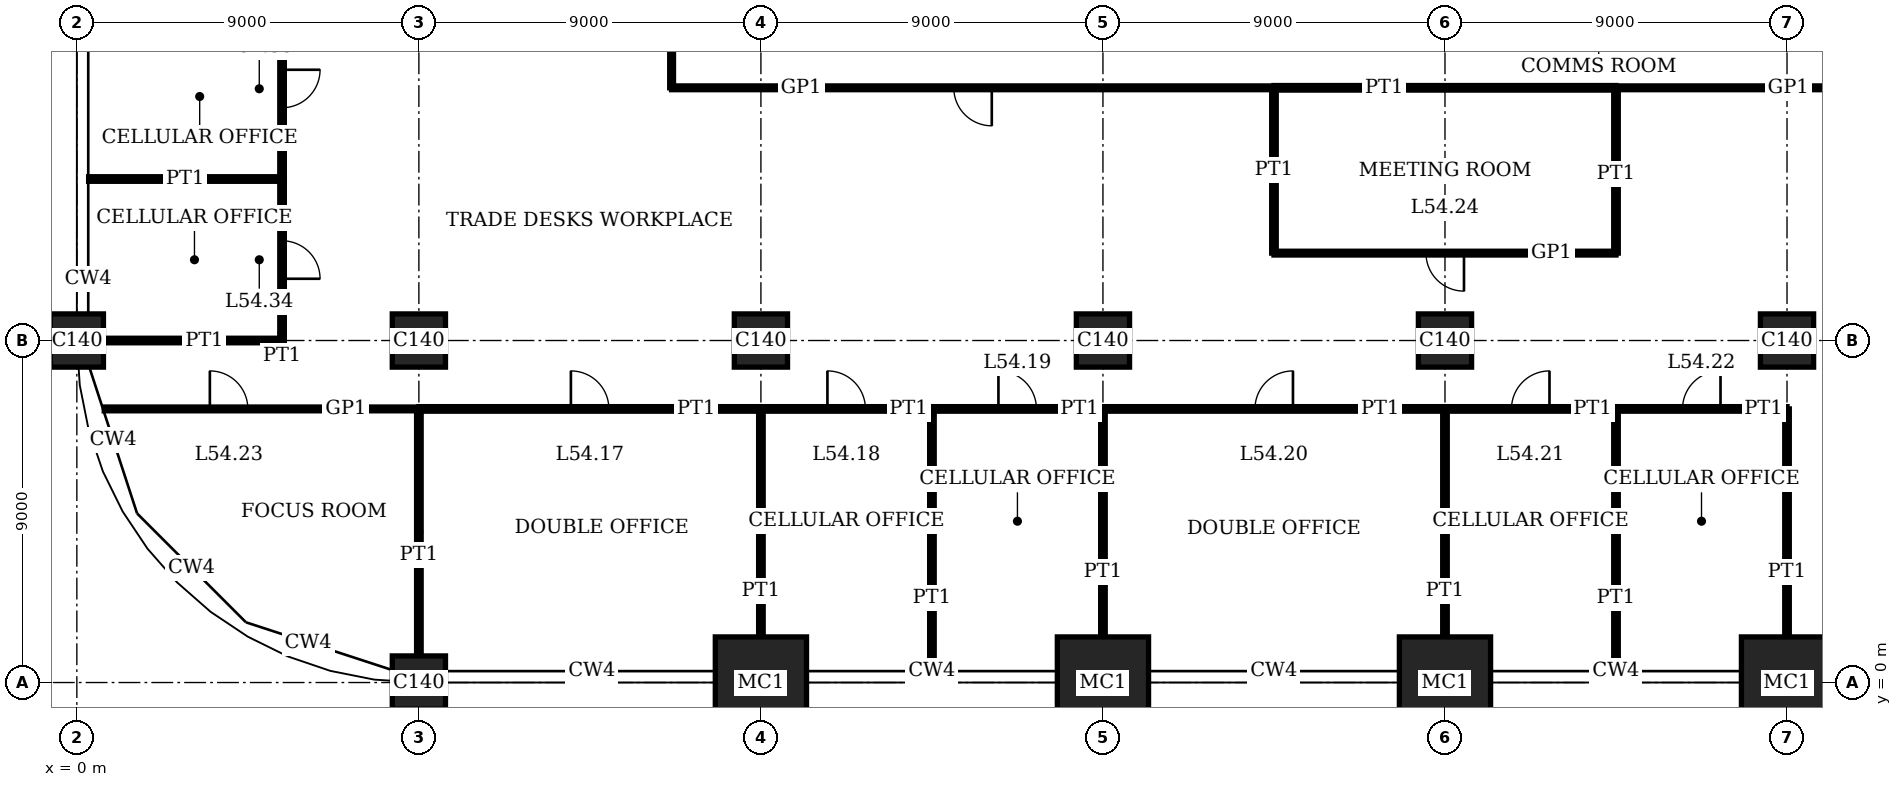
"""IFC4 building model, lengths in metres.
Left out: names, types, materials, properties, quantities, classifications, styles, units other than length and angle.
Written with IfcOpenShell. Run it as: python <this file> out.ifc"""

import sys

from ifc_helpers import new_model, si_unit, direction, frame, frame_2d, origin, origin_2d, place, context, subcontext, project, spatial, rectangle, extrude, element, fill, save


model = new_model("IFC4")
c1 = context("Model", 3, precision=1e-05, world=origin(), true_north=direction((0.0, 1.0)))
c2 = subcontext(c1, "Body", "Model", "MODEL_VIEW")
j1 = project(units=[si_unit("LENGTHUNIT", "METRE"), si_unit("PLANEANGLEUNIT", "RADIAN")], contexts=[c1])
p1 = place(None, origin())
s1 = spatial("IfcSite", under=j1, at=p1, CompositionType="ELEMENT")
p2 = place(p1, origin())
s2 = spatial("IfcBuilding", under=s1, at=p2, CompositionType="ELEMENT")
p3 = place(p2, frame((0.0, 0.0, 222.2)))
s3 = spatial("IfcBuildingStorey", under=s2, at=p3, CompositionType="ELEMENT", Elevation=222.2)
for number, where, z_axis, x_axis in (
    (1, (0.0, 9.0, 0.0), (0.0, 0.0, 1.0), (1.0, 0.0, 0.0)),
    (2, (9.0, 0.0, 0.0), (0.0, 0.0, 1.0), (1.0, 0.0, 0.0)),
    (3, (9.0, 9.0, 0.0), (0.0, 0.0, 1.0), (1.0, 0.0, 0.0)),
):
    element("IfcColumn", number, at=place(p3, frame(where, z_axis=z_axis, x_axis=x_axis)), inside=s3, PredefinedType="COLUMN", context=c2, shape_type="SweptSolid", body=[
        extrude(rectangle(XDim=1.4, YDim=1.4, at=origin_2d()), origin(), (0.0, 0.0, 1.0), 4.0),
    ])
p4 = place(p3, frame((18.0, 0.0, 0.0), z_axis=(0.0, 0.0, 1.0), x_axis=(1.0, 0.0, 0.0)))
e4 = element("IfcColumn", 4, at=p4, inside=s3, PredefinedType="COLUMN", context=c2, shape_type="SweptSolid", body=[
    extrude(rectangle(XDim=2.4, YDim=2.4, at=origin_2d()), origin(), (0.0, 0.0, 1.0), 4.0),
])
p5 = place(p3, frame((18.0, 9.0, 0.0), z_axis=(0.0, 0.0, 1.0), x_axis=(1.0, 0.0, 0.0)))
e5 = element("IfcColumn", 5, at=p5, inside=s3, PredefinedType="COLUMN", context=c2, shape_type="SweptSolid", body=[
    extrude(rectangle(XDim=1.4, YDim=1.4, at=origin_2d()), origin(), (0.0, 0.0, 1.0), 4.0),
])
p6 = place(p3, frame((27.0, 0.0, 0.0), z_axis=(0.0, 0.0, 1.0), x_axis=(1.0, 0.0, 0.0)))
e6 = element("IfcColumn", 6, at=p6, inside=s3, PredefinedType="COLUMN", context=c2, shape_type="SweptSolid", body=[
    extrude(rectangle(XDim=2.4, YDim=2.4, at=origin_2d()), origin(), (0.0, 0.0, 1.0), 4.0),
])
p7 = place(p3, frame((27.0, 9.0, 0.0), z_axis=(0.0, 0.0, 1.0), x_axis=(1.0, 0.0, 0.0)))
e7 = element("IfcColumn", 7, at=p7, inside=s3, PredefinedType="COLUMN", context=c2, shape_type="SweptSolid", body=[
    extrude(rectangle(XDim=1.4, YDim=1.4, at=origin_2d()), origin(), (0.0, 0.0, 1.0), 4.0),
])
p8 = place(p3, frame((36.0, 0.0, 0.0), z_axis=(0.0, 0.0, 1.0), x_axis=(1.0, 0.0, 0.0)))
e8 = element("IfcColumn", 8, at=p8, inside=s3, PredefinedType="COLUMN", context=c2, shape_type="SweptSolid", body=[
    extrude(rectangle(XDim=2.4, YDim=2.4, at=origin_2d()), origin(), (0.0, 0.0, 1.0), 4.0),
])
p9 = place(p3, frame((36.0, 9.0, 0.0), z_axis=(0.0, 0.0, 1.0), x_axis=(1.0, 0.0, 0.0)))
e9 = element("IfcColumn", 9, at=p9, inside=s3, PredefinedType="COLUMN", context=c2, shape_type="SweptSolid", body=[
    extrude(rectangle(XDim=1.4, YDim=1.4, at=origin_2d()), origin(), (0.0, 0.0, 1.0), 4.0),
])
p10 = place(p3, frame((45.0, 0.0, 0.0), z_axis=(0.0, 0.0, 1.0), x_axis=(1.0, 0.0, 0.0)))
e10 = element("IfcColumn", 10, at=p10, inside=s3, PredefinedType="COLUMN", context=c2, shape_type="SweptSolid", body=[
    extrude(rectangle(XDim=2.4, YDim=2.4, at=origin_2d()), origin(), (0.0, 0.0, 1.0), 4.0),
])
p11 = place(p3, frame((45.0, 9.0, 0.0), z_axis=(0.0, 0.0, 1.0), x_axis=(1.0, 0.0, 0.0)))
e11 = element("IfcColumn", 11, at=p11, inside=s3, PredefinedType="COLUMN", context=c2, shape_type="SweptSolid", body=[
    extrude(rectangle(XDim=1.4, YDim=1.4, at=origin_2d()), origin(), (0.0, 0.0, 1.0), 4.0),
])
p12 = place(p3, frame((9.0, 7.2, 0.0), z_axis=(0.0, 0.0, 1.0), x_axis=(1.0, 0.0, 0.0)))
e12 = element("IfcWall", 12, at=p12, inside=s3, PredefinedType="PARTITIONING", context=c2, shape_type="SweptSolid", body=[
    extrude(rectangle(XDim=9.0, YDim=0.12, at=frame_2d((4.5, 0.0))), origin(), (0.0, 0.0, 1.0), 3.75),
])
p13 = place(p12, frame((4.0, 0.0, 0.0)))
e13 = element("IfcOpeningElement", 13, at=p13, cuts=e12, PredefinedType="OPENING", context=c2, shape_type="SweptSolid", body=[
    extrude(rectangle(XDim=1.0, YDim=2.4, at=frame_2d((0.5, 1.2))), frame((0.0, 0.07, 0.0), z_axis=(0.0, -1.0, 0.0), x_axis=(1.0, 0.0, 0.0)), (0.0, 0.0, 1.0), 0.14),
])
p14 = place(p3, frame((18.0, 7.2, 0.0), z_axis=(0.0, 0.0, 1.0), x_axis=(1.0, 0.0, 0.0)))
e14 = element("IfcWall", 14, at=p14, inside=s3, PredefinedType="PARTITIONING", context=c2, shape_type="SweptSolid", body=[
    extrude(rectangle(XDim=4.5, YDim=0.12, at=frame_2d((2.25, 0.0))), origin(), (0.0, 0.0, 1.0), 3.75),
])
p15 = place(p14, frame((1.75, 0.0, 0.0)))
e15 = element("IfcOpeningElement", 15, at=p15, cuts=e14, PredefinedType="OPENING", context=c2, shape_type="SweptSolid", body=[
    extrude(rectangle(XDim=1.0, YDim=2.4, at=frame_2d((0.5, 1.2))), frame((0.0, 0.07, 0.0), z_axis=(0.0, -1.0, 0.0), x_axis=(1.0, 0.0, 0.0)), (0.0, 0.0, 1.0), 0.14),
])
p16 = place(p3, frame((22.5, 7.2, 0.0), z_axis=(0.0, 0.0, 1.0), x_axis=(1.0, 0.0, 0.0)))
e16 = element("IfcWall", 16, at=p16, inside=s3, PredefinedType="PARTITIONING", context=c2, shape_type="SweptSolid", body=[
    extrude(rectangle(XDim=4.5, YDim=0.12, at=frame_2d((2.25, 0.0))), origin(), (0.0, 0.0, 1.0), 3.75),
])
p17 = place(p16, frame((1.75, 0.0, 0.0)))
e17 = element("IfcOpeningElement", 17, at=p17, cuts=e16, PredefinedType="OPENING", context=c2, shape_type="SweptSolid", body=[
    extrude(rectangle(XDim=1.0, YDim=2.4, at=frame_2d((0.5, 1.2))), frame((0.0, 0.07, 0.0), z_axis=(0.0, -1.0, 0.0), x_axis=(1.0, 0.0, 0.0)), (0.0, 0.0, 1.0), 0.14),
])
p18 = place(p3, frame((27.0, 7.2, 0.0), z_axis=(0.0, 0.0, 1.0), x_axis=(1.0, 0.0, 0.0)))
e18 = element("IfcWall", 18, at=p18, inside=s3, PredefinedType="PARTITIONING", context=c2, shape_type="SweptSolid", body=[
    extrude(rectangle(XDim=9.0, YDim=0.12, at=frame_2d((4.5, 0.0))), origin(), (0.0, 0.0, 1.0), 3.75),
])
p19 = place(p18, frame((4.0, 0.0, 0.0)))
e19 = element("IfcOpeningElement", 19, at=p19, cuts=e18, PredefinedType="OPENING", context=c2, shape_type="SweptSolid", body=[
    extrude(rectangle(XDim=1.0, YDim=2.4, at=frame_2d((0.5, 1.2))), frame((0.0, 0.07, 0.0), z_axis=(0.0, -1.0, 0.0), x_axis=(1.0, 0.0, 0.0)), (0.0, 0.0, 1.0), 0.14),
])
p20 = place(p3, frame((36.0, 7.2, 0.0), z_axis=(0.0, 0.0, 1.0), x_axis=(1.0, 0.0, 0.0)))
e20 = element("IfcWall", 20, at=p20, inside=s3, PredefinedType="PARTITIONING", context=c2, shape_type="SweptSolid", body=[
    extrude(rectangle(XDim=4.5, YDim=0.12, at=frame_2d((2.25, 0.0))), origin(), (0.0, 0.0, 1.0), 3.75),
])
p21 = place(p20, frame((1.75, 0.0, 0.0)))
e21 = element("IfcOpeningElement", 21, at=p21, cuts=e20, PredefinedType="OPENING", context=c2, shape_type="SweptSolid", body=[
    extrude(rectangle(XDim=1.0, YDim=2.4, at=frame_2d((0.5, 1.2))), frame((0.0, 0.07, 0.0), z_axis=(0.0, -1.0, 0.0), x_axis=(1.0, 0.0, 0.0)), (0.0, 0.0, 1.0), 0.14),
])
p22 = place(p3, frame((40.5, 7.2, 0.0), z_axis=(0.0, 0.0, 1.0), x_axis=(1.0, 0.0, 0.0)))
e22 = element("IfcWall", 22, at=p22, inside=s3, PredefinedType="PARTITIONING", context=c2, shape_type="SweptSolid", body=[
    extrude(rectangle(XDim=4.5, YDim=0.12, at=frame_2d((2.25, 0.0))), origin(), (0.0, 0.0, 1.0), 3.75),
])
p23 = place(p22, frame((1.75, 0.0, 0.0)))
e23 = element("IfcOpeningElement", 23, at=p23, cuts=e22, PredefinedType="OPENING", context=c2, shape_type="SweptSolid", body=[
    extrude(rectangle(XDim=1.0, YDim=2.4, at=frame_2d((0.5, 1.2))), frame((0.0, 0.07, 0.0), z_axis=(0.0, -1.0, 0.0), x_axis=(1.0, 0.0, 0.0)), (0.0, 0.0, 1.0), 0.14),
])
p24 = place(p3, frame((0.72, 7.2, 0.0), z_axis=(0.0, 0.0, 1.0), x_axis=(1.0, 0.0, 0.0)))
e24 = element("IfcWall", 24, at=p24, inside=s3, PredefinedType="PARTITIONING", context=c2, shape_type="SweptSolid", body=[
    extrude(rectangle(XDim=8.28, YDim=0.1, at=frame_2d((4.14, 0.0))), origin(), (0.0, 0.0, 1.0), 3.75),
])
p25 = place(p24, frame((2.78, 0.0, 0.0)))
e25 = element("IfcOpeningElement", 25, at=p25, cuts=e24, PredefinedType="OPENING", context=c2, shape_type="SweptSolid", body=[
    extrude(rectangle(XDim=1.0, YDim=2.4, at=frame_2d((0.5, 1.2))), frame((0.0, 0.06, 0.0), z_axis=(0.0, -1.0, 0.0), x_axis=(1.0, 0.0, 0.0)), (0.0, 0.0, 1.0), 0.12),
])
p26 = place(p3, frame((0.7, 9.0, 0.0), z_axis=(0.0, 0.0, 1.0), x_axis=(1.0, 0.0, 0.0)))
e26 = element("IfcWall", 26, at=p26, inside=s3, PredefinedType="PARTITIONING", context=c2, shape_type="SweptSolid", body=[
    extrude(rectangle(XDim=4.7, YDim=0.12, at=frame_2d((2.35, 0.0))), origin(), (0.0, 0.0, 1.0), 3.05),
])
p27 = place(p3, frame((31.5, 11.3, 0.0), z_axis=(0.0, 0.0, 1.0), x_axis=(1.0, 0.0, 0.0)))
e27 = element("IfcWall", 27, at=p27, inside=s3, PredefinedType="PARTITIONING", context=c2, shape_type="SweptSolid", body=[
    extrude(rectangle(XDim=9.0, YDim=0.1, at=frame_2d((4.5, 0.0))), origin(), (0.0, 0.0, 1.0), 3.75),
])
p28 = place(p27, frame((4.0, 0.0, 0.0)))
e28 = element("IfcOpeningElement", 28, at=p28, cuts=e27, PredefinedType="OPENING", context=c2, shape_type="SweptSolid", body=[
    extrude(rectangle(XDim=1.0, YDim=2.4, at=frame_2d((0.5, 1.2))), frame((0.0, 0.06, 0.0), z_axis=(0.0, -1.0, 0.0), x_axis=(1.0, 0.0, 0.0)), (0.0, 0.0, 1.0), 0.12),
])
p29 = place(p3, frame((0.31, 13.25, 0.0), z_axis=(0.0, 0.0, 1.0), x_axis=(1.0, 0.0, 0.0)))
e29 = element("IfcWall", 29, at=p29, inside=s3, PredefinedType="PARTITIONING", context=c2, shape_type="SweptSolid", body=[
    extrude(rectangle(XDim=5.09, YDim=0.12, at=frame_2d((2.545, 0.0))), origin(), (0.0, 0.0, 1.0), 3.1),
])
p30 = place(p3, frame((31.5, 15.65, 0.0), z_axis=(0.0, 0.0, 1.0), x_axis=(1.0, 0.0, 0.0)))
e30 = element("IfcWall", 30, at=p30, inside=s3, PredefinedType="PARTITIONING", context=c2, shape_type="SweptSolid", body=[
    extrude(rectangle(XDim=9.0, YDim=0.12, at=frame_2d((4.5, 0.0))), origin(), (0.0, 0.0, 1.0), 3.75),
])
p31 = place(p3, frame((15.65, 15.65, 0.0), z_axis=(0.0, 0.0, 1.0), x_axis=(1.0, 0.0, 0.0)))
e31 = element("IfcWall", 31, at=p31, inside=s3, PredefinedType="PARTITIONING", context=c2, shape_type="SweptSolid", body=[
    extrude(rectangle(XDim=15.85, YDim=0.1, at=frame_2d((7.925, 0.0))), origin(), (0.0, 0.0, 1.0), 3.75),
])
p32 = place(p31, frame((7.425, 0.0, 0.0)))
e32 = element("IfcOpeningElement", 32, at=p32, cuts=e31, PredefinedType="OPENING", context=c2, shape_type="SweptSolid", body=[
    extrude(rectangle(XDim=1.0, YDim=2.4, at=frame_2d((0.5, 1.2))), frame((0.0, 0.06, 0.0), z_axis=(0.0, -1.0, 0.0), x_axis=(1.0, 0.0, 0.0)), (0.0, 0.0, 1.0), 0.12),
])
p33 = place(p3, frame((40.5, 15.65, 0.0), z_axis=(0.0, 0.0, 1.0), x_axis=(1.0, 0.0, 0.0)))
e33 = element("IfcWall", 33, at=p33, inside=s3, PredefinedType="PARTITIONING", context=c2, shape_type="SweptSolid", body=[
    extrude(rectangle(XDim=6.85, YDim=0.1, at=frame_2d((3.425, 0.0))), origin(), (0.0, 0.0, 1.0), 3.75),
])
p34 = place(p3, frame((5.4, 9.0, 0.0), z_axis=(0.0, 0.0, 1.0), x_axis=(0.0, 1.0, 0.0)))
e34 = element("IfcWall", 34, at=p34, inside=s3, PredefinedType="PARTITIONING", context=c2, shape_type="SweptSolid", body=[
    extrude(rectangle(XDim=4.25, YDim=0.12, at=frame_2d((2.125, 0.0))), origin(), (0.0, 0.0, 1.0), 3.75),
])
p35 = place(p34, frame((1.625, 0.0, 0.0)))
e35 = element("IfcOpeningElement", 35, at=p35, cuts=e34, PredefinedType="OPENING", context=c2, shape_type="SweptSolid", body=[
    extrude(rectangle(XDim=1.0, YDim=2.4, at=frame_2d((0.5, 1.2))), frame((0.0, 0.07, 0.0), z_axis=(0.0, -1.0, 0.0), x_axis=(1.0, 0.0, 0.0)), (0.0, 0.0, 1.0), 0.14),
])
p36 = place(p3, frame((5.4, 13.25, 0.0), z_axis=(0.0, 0.0, 1.0), x_axis=(0.0, 1.0, 0.0)))
e36 = element("IfcWall", 36, at=p36, inside=s3, PredefinedType="PARTITIONING", context=c2, shape_type="SweptSolid", body=[
    extrude(rectangle(XDim=4.75, YDim=0.12, at=frame_2d((2.375, 0.0))), origin(), (0.0, 0.0, 1.0), 3.75),
])
p37 = place(p36, frame((1.875, 0.0, 0.0)))
e37 = element("IfcOpeningElement", 37, at=p37, cuts=e36, PredefinedType="OPENING", context=c2, shape_type="SweptSolid", body=[
    extrude(rectangle(XDim=1.0, YDim=2.4, at=frame_2d((0.5, 1.2))), frame((0.0, 0.07, 0.0), z_axis=(0.0, -1.0, 0.0), x_axis=(1.0, 0.0, 0.0)), (0.0, 0.0, 1.0), 0.14),
])
p38 = place(p3, frame((9.0, 0.7, 0.0), z_axis=(0.0, 0.0, 1.0), x_axis=(0.0, 1.0, 0.0)))
e38 = element("IfcWall", 38, at=p38, inside=s3, PredefinedType="PARTITIONING", context=c2, shape_type="SweptSolid", body=[
    extrude(rectangle(XDim=6.5, YDim=0.12, at=frame_2d((3.25, 0.0))), origin(), (0.0, 0.0, 1.0), 3.05),
])
p39 = place(p3, frame((15.65, 15.65, 0.0), z_axis=(0.0, 0.0, 1.0), x_axis=(0.0, 1.0, 0.0)))
e39 = element("IfcWall", 39, at=p39, inside=s3, PredefinedType="PARTITIONING", context=c2, shape_type="SweptSolid", body=[
    extrude(rectangle(XDim=6.85, YDim=0.1, at=frame_2d((3.425, 0.0))), origin(), (0.0, 0.0, 1.0), 3.75),
])
p40 = place(p39, frame((2.925, 0.0, 0.0)))
e40 = element("IfcOpeningElement", 40, at=p40, cuts=e39, PredefinedType="OPENING", context=c2, shape_type="SweptSolid", body=[
    extrude(rectangle(XDim=1.0, YDim=2.4, at=frame_2d((0.5, 1.2))), frame((0.0, 0.06, 0.0), z_axis=(0.0, -1.0, 0.0), x_axis=(1.0, 0.0, 0.0)), (0.0, 0.0, 1.0), 0.12),
])
p41 = place(p3, frame((18.0, 1.2, 0.0), z_axis=(0.0, 0.0, 1.0), x_axis=(0.0, 1.0, 0.0)))
e41 = element("IfcWall", 41, at=p41, inside=s3, PredefinedType="PARTITIONING", context=c2, shape_type="SweptSolid", body=[
    extrude(rectangle(XDim=6.0, YDim=0.12, at=frame_2d((3.0, 0.0))), origin(), (0.0, 0.0, 1.0), 3.05),
])
p42 = place(p3, frame((22.5, 0.31, 0.0), z_axis=(0.0, 0.0, 1.0), x_axis=(0.0, 1.0, 0.0)))
e42 = element("IfcWall", 42, at=p42, inside=s3, PredefinedType="PARTITIONING", context=c2, shape_type="SweptSolid", body=[
    extrude(rectangle(XDim=6.89, YDim=0.12, at=frame_2d((3.445, 0.0))), origin(), (0.0, 0.0, 1.0), 3.75),
])
p43 = place(p3, frame((27.0, 1.2, 0.0), z_axis=(0.0, 0.0, 1.0), x_axis=(0.0, 1.0, 0.0)))
e43 = element("IfcWall", 43, at=p43, inside=s3, PredefinedType="PARTITIONING", context=c2, shape_type="SweptSolid", body=[
    extrude(rectangle(XDim=6.0, YDim=0.12, at=frame_2d((3.0, 0.0))), origin(), (0.0, 0.0, 1.0), 3.05),
])
p44 = place(p3, frame((31.5, 11.3, 0.0), z_axis=(0.0, 0.0, 1.0), x_axis=(0.0, 1.0, 0.0)))
e44 = element("IfcWall", 44, at=p44, inside=s3, PredefinedType="PARTITIONING", context=c2, shape_type="SweptSolid", body=[
    extrude(rectangle(XDim=4.35, YDim=0.12, at=frame_2d((2.175, 0.0))), origin(), (0.0, 0.0, 1.0), 3.75),
])
p45 = place(p3, frame((36.0, 1.2, 0.0), z_axis=(0.0, 0.0, 1.0), x_axis=(0.0, 1.0, 0.0)))
e45 = element("IfcWall", 45, at=p45, inside=s3, PredefinedType="PARTITIONING", context=c2, shape_type="SweptSolid", body=[
    extrude(rectangle(XDim=6.0, YDim=0.12, at=frame_2d((3.0, 0.0))), origin(), (0.0, 0.0, 1.0), 3.05),
])
p46 = place(p3, frame((40.5, 0.31, 0.0), z_axis=(0.0, 0.0, 1.0), x_axis=(0.0, 1.0, 0.0)))
e46 = element("IfcWall", 46, at=p46, inside=s3, PredefinedType="PARTITIONING", context=c2, shape_type="SweptSolid", body=[
    extrude(rectangle(XDim=6.89, YDim=0.12, at=frame_2d((3.445, 0.0))), origin(), (0.0, 0.0, 1.0), 3.75),
])
p47 = place(p3, frame((40.5, 11.3, 0.0), z_axis=(0.0, 0.0, 1.0), x_axis=(0.0, 1.0, 0.0)))
e47 = element("IfcWall", 47, at=p47, inside=s3, PredefinedType="PARTITIONING", context=c2, shape_type="SweptSolid", body=[
    extrude(rectangle(XDim=4.35, YDim=0.12, at=frame_2d((2.175, 0.0))), origin(), (0.0, 0.0, 1.0), 3.75),
])
p48 = place(p3, frame((45.0, 1.2, 0.0), z_axis=(0.0, 0.0, 1.0), x_axis=(0.0, 1.0, 0.0)))
e48 = element("IfcWall", 48, at=p48, inside=s3, PredefinedType="PARTITIONING", context=c2, shape_type="SweptSolid", body=[
    extrude(rectangle(XDim=6.0, YDim=0.12, at=frame_2d((3.0, 0.0))), origin(), (0.0, 0.0, 1.0), 3.05),
])
p49 = place(p13, origin())
e49 = element("IfcDoor", 49, at=p49, inside=s3, OperationType="SINGLE_SWING_RIGHT", PredefinedType="DOOR", context=c2, shape_type="SweptSolid", body=[
    extrude(rectangle(XDim=1.0, YDim=2.4, at=frame_2d((0.5, 1.2))), frame((0.0, 0.025, 0.0), z_axis=(0.0, -1.0, 0.0), x_axis=(1.0, 0.0, 0.0)), (0.0, 0.0, 1.0), 0.05),
])
fill(e13, e49)
p50 = place(p15, origin())
e50 = element("IfcDoor", 50, at=p50, inside=s3, OperationType="SINGLE_SWING_RIGHT", PredefinedType="DOOR", context=c2, shape_type="SweptSolid", body=[
    extrude(rectangle(XDim=1.0, YDim=2.4, at=frame_2d((0.5, 1.2))), frame((0.0, 0.025, 0.0), z_axis=(0.0, -1.0, 0.0), x_axis=(1.0, 0.0, 0.0)), (0.0, 0.0, 1.0), 0.05),
])
fill(e15, e50)
p51 = place(p17, origin())
e51 = element("IfcDoor", 51, at=p51, inside=s3, OperationType="SINGLE_SWING_RIGHT", PredefinedType="DOOR", context=c2, shape_type="SweptSolid", body=[
    extrude(rectangle(XDim=1.0, YDim=2.4, at=frame_2d((0.5, 1.2))), frame((0.0, 0.025, 0.0), z_axis=(0.0, -1.0, 0.0), x_axis=(1.0, 0.0, 0.0)), (0.0, 0.0, 1.0), 0.05),
])
fill(e17, e51)
p52 = place(p19, origin())
e52 = element("IfcDoor", 52, at=p52, inside=s3, OperationType="SINGLE_SWING_LEFT", PredefinedType="DOOR", context=c2, shape_type="SweptSolid", body=[
    extrude(rectangle(XDim=1.0, YDim=2.4, at=frame_2d((0.5, 1.2))), frame((0.0, 0.025, 0.0), z_axis=(0.0, -1.0, 0.0), x_axis=(1.0, 0.0, 0.0)), (0.0, 0.0, 1.0), 0.05),
])
fill(e19, e52)
p53 = place(p21, origin())
e53 = element("IfcDoor", 53, at=p53, inside=s3, OperationType="SINGLE_SWING_LEFT", PredefinedType="DOOR", context=c2, shape_type="SweptSolid", body=[
    extrude(rectangle(XDim=1.0, YDim=2.4, at=frame_2d((0.5, 1.2))), frame((0.0, 0.025, 0.0), z_axis=(0.0, -1.0, 0.0), x_axis=(1.0, 0.0, 0.0)), (0.0, 0.0, 1.0), 0.05),
])
fill(e21, e53)
p54 = place(p23, origin())
e54 = element("IfcDoor", 54, at=p54, inside=s3, OperationType="SINGLE_SWING_LEFT", PredefinedType="DOOR", context=c2, shape_type="SweptSolid", body=[
    extrude(rectangle(XDim=1.0, YDim=2.4, at=frame_2d((0.5, 1.2))), frame((0.0, 0.025, 0.0), z_axis=(0.0, -1.0, 0.0), x_axis=(1.0, 0.0, 0.0)), (0.0, 0.0, 1.0), 0.05),
])
fill(e23, e54)
p55 = place(p25, origin())
e55 = element("IfcDoor", 55, at=p55, inside=s3, OperationType="SINGLE_SWING_RIGHT", PredefinedType="DOOR", context=c2, shape_type="SweptSolid", body=[
    extrude(rectangle(XDim=1.0, YDim=2.4, at=frame_2d((0.5, 1.2))), frame((0.0, 0.02, 0.0), z_axis=(0.0, -1.0, 0.0), x_axis=(1.0, 0.0, 0.0)), (0.0, 0.0, 1.0), 0.04),
])
fill(e25, e55)
p56 = place(p28, origin())
e56 = element("IfcDoor", 56, at=p56, inside=s3, OperationType="SINGLE_SWING_RIGHT", PredefinedType="DOOR", context=c2, shape_type="SweptSolid", body=[
    extrude(rectangle(XDim=1.0, YDim=2.4, at=frame_2d((0.5, 1.2))), frame((0.0, 0.02, 0.0), z_axis=(0.0, -1.0, 0.0), x_axis=(1.0, 0.0, 0.0)), (0.0, 0.0, 1.0), 0.04),
])
fill(e28, e56)
p57 = place(p32, origin())
e57 = element("IfcDoor", 57, at=p57, inside=s3, OperationType="SINGLE_SWING_RIGHT", PredefinedType="DOOR", context=c2, shape_type="SweptSolid", body=[
    extrude(rectangle(XDim=1.0, YDim=2.4, at=frame_2d((0.5, 1.2))), frame((0.0, 0.02, 0.0), z_axis=(0.0, -1.0, 0.0), x_axis=(1.0, 0.0, 0.0)), (0.0, 0.0, 1.0), 0.04),
])
fill(e32, e57)
p58 = place(p35, origin())
e58 = element("IfcDoor", 58, at=p58, inside=s3, OperationType="SINGLE_SWING_LEFT", PredefinedType="DOOR", context=c2, shape_type="SweptSolid", body=[
    extrude(rectangle(XDim=1.0, YDim=2.4, at=frame_2d((0.5, 1.2))), frame((0.0, 0.025, 0.0), z_axis=(0.0, -1.0, 0.0), x_axis=(1.0, 0.0, 0.0)), (0.0, 0.0, 1.0), 0.05),
])
fill(e35, e58)
p59 = place(p37, origin())
e59 = element("IfcDoor", 59, at=p59, inside=s3, OperationType="SINGLE_SWING_RIGHT", PredefinedType="DOOR", context=c2, shape_type="SweptSolid", body=[
    extrude(rectangle(XDim=1.0, YDim=2.4, at=frame_2d((0.5, 1.2))), frame((0.0, 0.025, 0.0), z_axis=(0.0, -1.0, 0.0), x_axis=(1.0, 0.0, 0.0)), (0.0, 0.0, 1.0), 0.05),
])
fill(e37, e59)
save(model, sys.argv[1])
